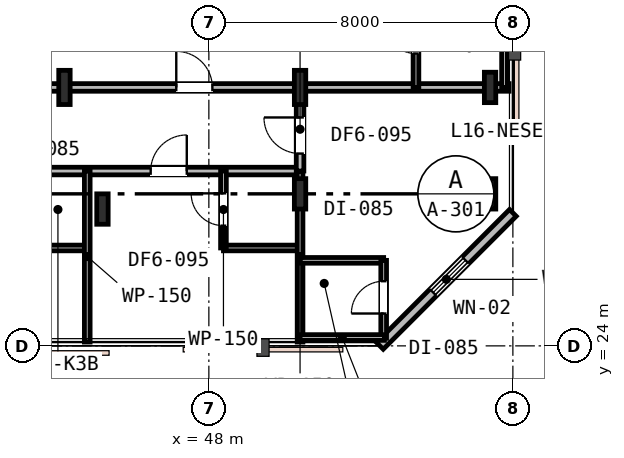
"""IFC4 building model, lengths in metres.
Left out: names, types, materials, properties, quantities, classifications, styles, units other than length and angle.
Written with IfcOpenShell. Run it as: python <this file> out.ifc"""

import sys

from ifc_helpers import new_model, si_unit, direction, frame, frame_2d, origin, origin_2d, place, context, subcontext, project, spatial, rectangle, i_section, extrude, element, fill, save


model = new_model("IFC4")
c1 = context("Model", 3, precision=1e-05, world=origin(), true_north=direction((0.0, 1.0)))
c2 = subcontext(c1, "Body", "Model", "MODEL_VIEW")
j1 = project(units=[si_unit("LENGTHUNIT", "METRE"), si_unit("PLANEANGLEUNIT", "RADIAN")], contexts=[c1])
p1 = place(None, origin())
s1 = spatial("IfcSite", under=j1, at=p1, CompositionType="ELEMENT")
p2 = place(p1, origin())
s2 = spatial("IfcBuilding", under=s1, at=p2, CompositionType="ELEMENT")
p3 = place(p2, frame((0.0, 0.0, 65.4)))
s3 = spatial("IfcBuildingStorey", under=s2, at=p3, CompositionType="ELEMENT", Elevation=65.4)
for number, where, z_axis, x_axis in (
    (1, (45.2, 27.6, 0.0), (0.0, 0.0, 1.0), (1.0, 0.0, 0.0)),
    (2, (50.4, 28.0, 0.0), (0.0, 0.0, 1.0), (1.0, 0.0, 0.0)),
    (3, (55.4, 28.0, 0.0), (0.0, 0.0, 1.0), (1.0, 0.0, 0.0)),
    (4, (55.4, 30.8, 0.0), (0.0, 0.0, 1.0), (1.0, 0.0, 0.0)),
):
    element("IfcColumn", number, at=place(p3, frame(where, z_axis=z_axis, x_axis=x_axis)), inside=s3, PredefinedType="COLUMN", context=c2, shape_type="SweptSolid", body=[
        extrude(i_section(OverallWidth=0.3, OverallDepth=0.8, WebThickness=0.018, FlangeThickness=0.033, FilletRadius=0.03, at=origin_2d()), origin(), (0.0, 0.0, 1.0), 3.6),
    ])
for number, where, z_axis, x_axis in (
    (5, (44.2, 30.8, 0.0), (0.0, 0.0, 1.0), (1.0, 0.0, 0.0)),
    (6, (50.4, 30.8, 0.0), (0.0, 0.0, 1.0), (1.0, 0.0, 0.0)),
):
    element("IfcColumn", number, at=place(p3, frame(where, z_axis=z_axis, x_axis=x_axis)), inside=s3, PredefinedType="COLUMN", context=c2, shape_type="SweptSolid", body=[
        extrude(i_section(OverallWidth=0.3, OverallDepth=0.9, WebThickness=0.018, FlangeThickness=0.035, FilletRadius=0.03, at=origin_2d()), origin(), (0.0, 0.0, 1.0), 3.6),
    ])
p4 = place(p3, frame((52.5, 24.0, 0.0), z_axis=(0.0, 0.0, 1.0), x_axis=(0.707106781187, 0.707106781187, 0.0)))
e7 = element("IfcWall", 7, at=p4, inside=s3, PredefinedType="STANDARD", context=c2, shape_type="SweptSolid", body=[
    extrude(rectangle(XDim=4.95, YDim=0.25, at=frame_2d((2.475, 0.0))), origin(), (0.0, 0.0, 1.0), 3.33),
])
p5 = place(p4, frame((1.985, 0.0, 0.85)))
e8 = element("IfcOpeningElement", 8, at=p5, cuts=e7, PredefinedType="OPENING", context=c2, shape_type="SweptSolid", body=[
    extrude(rectangle(XDim=1.2, YDim=1.6, at=frame_2d((0.6, 0.8))), frame((0.0, 0.135, 0.0), z_axis=(0.0, -1.0, 0.0), x_axis=(1.0, 0.0, 0.0)), (0.0, 0.0, 1.0), 0.27),
])
p6 = place(p3, frame((11.8, 28.6, 0.0), z_axis=(0.0, 0.0, 1.0), x_axis=(1.0, 0.0, 0.0)))
e9 = element("IfcWall", 9, at=p6, inside=s3, PredefinedType="PARTITIONING", context=c2, shape_type="SweptSolid", body=[
    extrude(rectangle(XDim=38.6, YDim=0.2, at=frame_2d((19.3, 0.0))), origin(), (0.0, 0.0, 1.0), 2.83),
])
p7 = place(p6, frame((14.3, 0.0, 0.0)))
e10 = element("IfcOpeningElement", 10, at=p7, cuts=e9, PredefinedType="OPENING", context=c2, shape_type="SweptSolid", body=[
    extrude(rectangle(XDim=0.95, YDim=2.15, at=frame_2d((0.475, 1.075))), frame((0.0, 0.11, 0.0), z_axis=(0.0, -1.0, 0.0), x_axis=(1.0, 0.0, 0.0)), (0.0, 0.0, 1.0), 0.22),
])
p8 = place(p6, frame((22.075, 0.0, 0.0)))
e11 = element("IfcOpeningElement", 11, at=p8, cuts=e9, PredefinedType="OPENING", context=c2, shape_type="SweptSolid", body=[
    extrude(rectangle(XDim=0.95, YDim=2.15, at=frame_2d((0.475, 1.075))), frame((0.0, 0.11, 0.0), z_axis=(0.0, -1.0, 0.0), x_axis=(1.0, 0.0, 0.0)), (0.0, 0.0, 1.0), 0.22),
])
p9 = place(p6, frame((28.829, 0.0, 0.0)))
e12 = element("IfcOpeningElement", 12, at=p9, cuts=e9, PredefinedType="OPENING", context=c2, shape_type="SweptSolid", body=[
    extrude(rectangle(XDim=0.95, YDim=2.15, at=frame_2d((0.475, 1.075))), frame((0.0, 0.11, 0.0), z_axis=(0.0, -1.0, 0.0), x_axis=(1.0, 0.0, 0.0)), (0.0, 0.0, 1.0), 0.22),
])
p10 = place(p6, frame((34.669, 0.0, 0.0)))
e13 = element("IfcOpeningElement", 13, at=p10, cuts=e9, PredefinedType="OPENING", context=c2, shape_type="SweptSolid", body=[
    extrude(rectangle(XDim=0.95, YDim=2.15, at=frame_2d((0.475, 1.075))), frame((0.0, 0.11, 0.0), z_axis=(0.0, -1.0, 0.0), x_axis=(1.0, 0.0, 0.0)), (0.0, 0.0, 1.0), 0.22),
])
p11 = place(p3, frame((42.892, 26.576, 0.0), z_axis=(0.0, 0.0, 1.0), x_axis=(1.0, 0.0, 0.0)))
e14 = element("IfcWall", 14, at=p11, inside=s3, PredefinedType="PARTITIONING", context=c2, shape_type="SweptSolid", body=[
    extrude(rectangle(XDim=1.908, YDim=0.15, at=frame_2d((0.954, 0.0))), origin(), (0.0, 0.0, 1.0), 3.33),
])
p12 = place(p3, frame((44.8, 28.6, 0.0), z_axis=(0.0, 0.0, 1.0), x_axis=(0.0, -1.0, 0.0)))
e15 = element("IfcWall", 15, at=p12, inside=s3, PredefinedType="PARTITIONING", context=c2, shape_type="SweptSolid", body=[
    extrude(rectangle(XDim=4.5, YDim=0.15, at=frame_2d((2.25, 0.0))), origin(), (0.0, 0.0, 1.0), 2.83),
])
p13 = place(p3, frame((48.384, 26.576, 0.0), z_axis=(0.0, 0.0, 1.0), x_axis=(1.0, 0.0, 0.0)))
e16 = element("IfcWall", 16, at=p13, inside=s3, PredefinedType="PARTITIONING", context=c2, shape_type="SweptSolid", body=[
    extrude(rectangle(XDim=2.016, YDim=0.15, at=frame_2d((1.008, 0.0))), origin(), (0.0, 0.0, 1.0), 3.33),
])
p14 = place(p3, frame((48.384, 26.576, 0.0), z_axis=(0.0, 0.0, 1.0), x_axis=(0.0, 1.0, 0.0)))
e17 = element("IfcWall", 17, at=p14, inside=s3, PredefinedType="PARTITIONING", context=c2, shape_type="SweptSolid", body=[
    extrude(rectangle(XDim=2.024, YDim=0.15, at=frame_2d((1.012, 0.0))), origin(), (0.0, 0.0, 1.0), 3.33),
])
p15 = place(p14, frame((0.587, 0.0, 0.0)))
e18 = element("IfcOpeningElement", 18, at=p15, cuts=e17, PredefinedType="OPENING", context=c2, shape_type="SweptSolid", body=[
    extrude(rectangle(XDim=0.85, YDim=2.15, at=frame_2d((0.425, 1.075))), frame((0.0, 0.085, 0.0), z_axis=(0.0, -1.0, 0.0), x_axis=(1.0, 0.0, 0.0)), (0.0, 0.0, 1.0), 0.17),
])
p16 = place(p3, frame((50.4, 28.6, 0.0), z_axis=(0.0, 0.0, 1.0), x_axis=(0.0, -1.0, 0.0)))
e19 = element("IfcWall", 19, at=p16, inside=s3, PredefinedType="PARTITIONING", context=c2, shape_type="SweptSolid", body=[
    extrude(rectangle(XDim=4.5, YDim=0.15, at=frame_2d((2.25, 0.0))), origin(), (0.0, 0.0, 1.0), 2.83),
])
p17 = place(p3, frame((40.47, 30.8, 0.0), z_axis=(0.0, 0.0, 1.0), x_axis=(1.0, 0.0, 0.0)))
e20 = element("IfcWall", 20, at=p17, inside=s3, PredefinedType="PARTITIONING", context=c2, shape_type="SweptSolid", body=[
    extrude(rectangle(XDim=15.43, YDim=0.2, at=frame_2d((7.715, 0.0))), origin(), (0.0, 0.0, 1.0), 2.83),
])
p18 = place(p17, frame((6.673, 0.0, 0.0)))
e21 = element("IfcOpeningElement", 21, at=p18, cuts=e20, PredefinedType="OPENING", context=c2, shape_type="SweptSolid", body=[
    extrude(rectangle(XDim=0.95, YDim=2.15, at=frame_2d((0.475, 1.075))), frame((0.0, 0.11, 0.0), z_axis=(0.0, -1.0, 0.0), x_axis=(1.0, 0.0, 0.0)), (0.0, 0.0, 1.0), 0.22),
])
p19 = place(p3, frame((53.45, 30.8, 0.0), z_axis=(0.0, 0.0, 1.0), x_axis=(0.0, 1.0, 0.0)))
e22 = element("IfcWall", 22, at=p19, inside=s3, PredefinedType="PARTITIONING", context=c2, shape_type="SweptSolid", body=[
    extrude(rectangle(XDim=2.2, YDim=0.15, at=frame_2d((1.1, 0.0))), origin(), (0.0, 0.0, 1.0), 2.83),
])
p20 = place(p19, frame((0.892, 0.0, 0.0)))
e23 = element("IfcOpeningElement", 23, at=p20, cuts=e22, PredefinedType="OPENING", context=c2, shape_type="SweptSolid", body=[
    extrude(rectangle(XDim=0.85, YDim=2.15, at=frame_2d((0.425, 1.075))), frame((0.0, 0.085, 0.0), z_axis=(0.0, -1.0, 0.0), x_axis=(1.0, 0.0, 0.0)), (0.0, 0.0, 1.0), 0.17),
])
p21 = place(p3, frame((55.78, 33.0, 0.0), z_axis=(0.0, 0.0, 1.0), x_axis=(0.0, -1.0, 0.0)))
e24 = element("IfcWall", 24, at=p21, inside=s3, PredefinedType="PARTITIONING", context=c2, shape_type="SweptSolid", body=[
    extrude(rectangle(XDim=2.2, YDim=0.15, at=frame_2d((1.1, 0.0))), origin(), (0.0, 0.0, 1.0), 2.83),
])
p22 = place(p3, frame((50.4, 28.6, 0.0), z_axis=(0.0, 0.0, 1.0), x_axis=(0.0, 1.0, 0.0)))
e25 = element("IfcWall", 25, at=p22, inside=s3, PredefinedType="PARTITIONING", context=c2, shape_type="SweptSolid", body=[
    extrude(rectangle(XDim=2.2, YDim=0.2, at=frame_2d((1.1, 0.0))), origin(), (0.0, 0.0, 1.0), 2.83),
])
p23 = place(p22, frame((0.46, 0.0, 0.0)))
e26 = element("IfcOpeningElement", 26, at=p23, cuts=e25, PredefinedType="OPENING", context=c2, shape_type="SweptSolid", body=[
    extrude(rectangle(XDim=0.95, YDim=2.15, at=frame_2d((0.475, 1.075))), frame((0.0, 0.11, 0.0), z_axis=(0.0, -1.0, 0.0), x_axis=(1.0, 0.0, 0.0)), (0.0, 0.0, 1.0), 0.22),
])
p24 = place(p3, frame((50.4, 26.25, 0.0), z_axis=(0.0, 0.0, 1.0), x_axis=(1.0, 0.0, 0.0)))
e27 = element("IfcWall", 27, at=p24, inside=s3, PredefinedType="PARTITIONING", context=c2, shape_type="SweptSolid", body=[
    extrude(rectangle(XDim=2.2, YDim=0.15, at=frame_2d((1.1, 0.0))), origin(), (0.0, 0.0, 1.0), 3.33),
])
p25 = place(p3, frame((52.6, 24.2, 0.0), z_axis=(0.0, 0.0, 1.0), x_axis=(0.0, 1.0, 0.0)))
e28 = element("IfcWall", 28, at=p25, inside=s3, PredefinedType="PARTITIONING", context=c2, shape_type="SweptSolid", body=[
    extrude(rectangle(XDim=2.05, YDim=0.15, at=frame_2d((1.025, 0.0))), origin(), (0.0, 0.0, 1.0), 3.33),
])
p26 = place(p25, frame((0.651, 0.0, 0.0)))
e29 = element("IfcOpeningElement", 29, at=p26, cuts=e28, PredefinedType="OPENING", context=c2, shape_type="SweptSolid", body=[
    extrude(rectangle(XDim=0.85, YDim=2.15, at=frame_2d((0.425, 1.075))), frame((0.0, 0.085, 0.0), z_axis=(0.0, -1.0, 0.0), x_axis=(1.0, 0.0, 0.0)), (0.0, 0.0, 1.0), 0.17),
])
p27 = place(p3, frame((52.62, 24.22, 0.0), z_axis=(0.0, 0.0, 1.0), x_axis=(-1.0, 0.0, 0.0)))
e30 = element("IfcWall", 30, at=p27, inside=s3, PredefinedType="PARTITIONING", context=c2, shape_type="SweptSolid", body=[
    extrude(rectangle(XDim=2.22, YDim=0.15, at=frame_2d((1.11, 0.0))), origin(), (0.0, 0.0, 1.0), 3.33),
])
p28 = place(p5, origin())
e31 = element("IfcWindow", 31, at=p28, inside=s3, PartitioningType="SINGLE_PANEL", PredefinedType="WINDOW", context=c2, shape_type="SweptSolid", body=[
    extrude(rectangle(XDim=1.2, YDim=1.6, at=frame_2d((0.6, 0.8))), frame((0.0, 0.03, 0.0), z_axis=(0.0, -1.0, 0.0), x_axis=(1.0, 0.0, 0.0)), (0.0, 0.0, 1.0), 0.06),
])
fill(e8, e31)
p29 = place(p10, origin())
e32 = element("IfcDoor", 32, at=p29, inside=s3, OperationType="SINGLE_SWING_RIGHT", PredefinedType="DOOR", context=c2, shape_type="SweptSolid", body=[
    extrude(rectangle(XDim=0.95, YDim=2.15, at=frame_2d((0.475, 1.075))), frame((0.0, 0.025, 0.0), z_axis=(0.0, -1.0, 0.0), x_axis=(1.0, 0.0, 0.0)), (0.0, 0.0, 1.0), 0.05),
])
fill(e13, e32)
p30 = place(p15, origin())
e33 = element("IfcDoor", 33, at=p30, inside=s3, OperationType="SINGLE_SWING_RIGHT", PredefinedType="DOOR", context=c2, shape_type="SweptSolid", body=[
    extrude(rectangle(XDim=0.85, YDim=2.15, at=frame_2d((0.425, 1.075))), frame((0.0, 0.025, 0.0), z_axis=(0.0, -1.0, 0.0), x_axis=(1.0, 0.0, 0.0)), (0.0, 0.0, 1.0), 0.05),
])
fill(e18, e33)
p31 = place(p18, origin())
e34 = element("IfcDoor", 34, at=p31, inside=s3, OperationType="SINGLE_SWING_LEFT", PredefinedType="DOOR", context=c2, shape_type="SweptSolid", body=[
    extrude(rectangle(XDim=0.95, YDim=2.15, at=frame_2d((0.475, 1.075))), frame((0.0, 0.025, 0.0), z_axis=(0.0, -1.0, 0.0), x_axis=(1.0, 0.0, 0.0)), (0.0, 0.0, 1.0), 0.05),
])
fill(e21, e34)
p32 = place(p20, origin())
e35 = element("IfcDoor", 35, at=p32, inside=s3, OperationType="SINGLE_SWING_RIGHT", PredefinedType="DOOR", context=c2, shape_type="SweptSolid", body=[
    extrude(rectangle(XDim=0.85, YDim=2.15, at=frame_2d((0.425, 1.075))), frame((0.0, 0.025, 0.0), z_axis=(0.0, -1.0, 0.0), x_axis=(1.0, 0.0, 0.0)), (0.0, 0.0, 1.0), 0.05),
])
fill(e23, e35)
p33 = place(p23, origin())
e36 = element("IfcDoor", 36, at=p33, inside=s3, OperationType="SINGLE_SWING_RIGHT", PredefinedType="DOOR", context=c2, shape_type="SweptSolid", body=[
    extrude(rectangle(XDim=0.95, YDim=2.15, at=frame_2d((0.475, 1.075))), frame((0.0, 0.025, 0.0), z_axis=(0.0, -1.0, 0.0), x_axis=(1.0, 0.0, 0.0)), (0.0, 0.0, 1.0), 0.05),
])
fill(e26, e36)
p34 = place(p26, origin())
e37 = element("IfcDoor", 37, at=p34, inside=s3, OperationType="SINGLE_SWING_LEFT", PredefinedType="DOOR", context=c2, shape_type="SweptSolid", body=[
    extrude(rectangle(XDim=0.85, YDim=2.15, at=frame_2d((0.425, 1.075))), frame((0.0, 0.025, 0.0), z_axis=(0.0, -1.0, 0.0), x_axis=(1.0, 0.0, 0.0)), (0.0, 0.0, 1.0), 0.05),
])
fill(e29, e37)
save(model, sys.argv[1])
